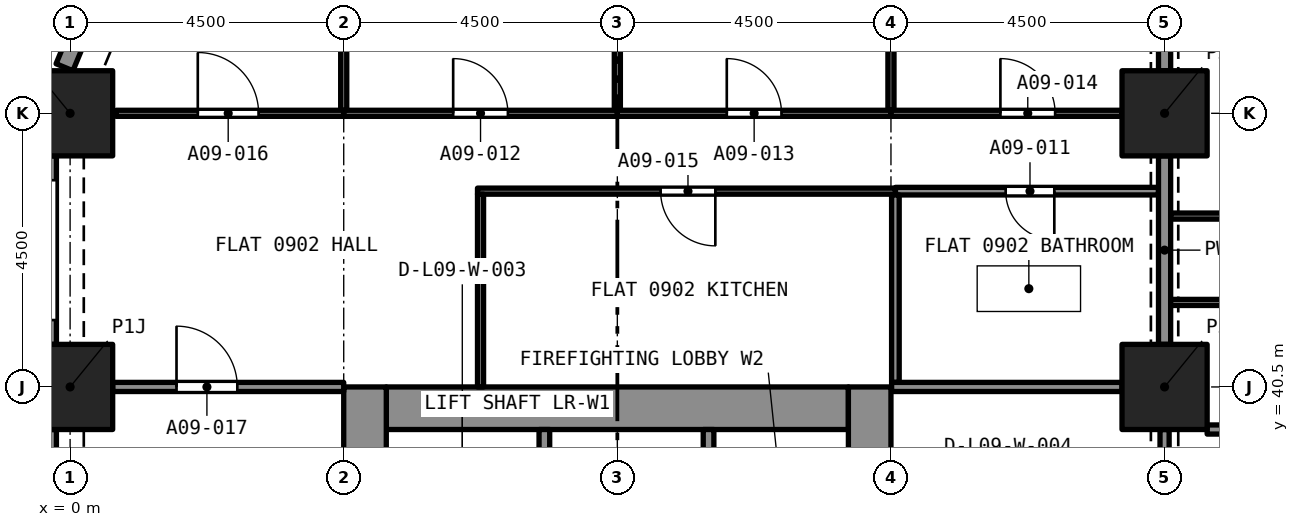
"""IFC4 building model, lengths in metres.
Left out: names, types, materials, properties, quantities, classifications, styles, units other than length and angle.
Written with IfcOpenShell. Run it as: python <this file> out.ifc"""

import sys

from ifc_helpers import new_model, si_unit, direction, frame, frame_2d, origin, origin_2d, place, context, subcontext, project, spatial, rectangle, extrude, element, fill, save


model = new_model("IFC4")
c1 = context("Model", 3, precision=1e-05, world=origin(), true_north=direction((0.0, 1.0)))
c2 = subcontext(c1, "Body", "Model", "MODEL_VIEW")
j1 = project(units=[si_unit("LENGTHUNIT", "METRE"), si_unit("PLANEANGLEUNIT", "RADIAN")], contexts=[c1])
p1 = place(None, origin())
s1 = spatial("IfcSite", under=j1, at=p1, CompositionType="ELEMENT")
p2 = place(p1, origin())
s2 = spatial("IfcBuilding", under=s1, at=p2, CompositionType="ELEMENT")
p3 = place(p2, frame((0.0, 0.0, 40.0)))
s3 = spatial("IfcBuildingStorey", under=s2, at=p3, CompositionType="ELEMENT", Elevation=40.0)
for number, where, z_axis, x_axis in (
    (1, (0.0, 40.5, 0.0), (0.0, 0.0, 1.0), (1.0, 0.0, 0.0)),
    (2, (18.0, 40.5, 0.0), (0.0, 0.0, 1.0), (1.0, 0.0, 0.0)),
    (3, (0.0, 45.0, 0.0), (0.0, 0.0, 1.0), (1.0, 0.0, 0.0)),
    (4, (18.0, 45.0, 0.0), (0.0, 0.0, 1.0), (1.0, 0.0, 0.0)),
):
    element("IfcColumn", number, at=place(p3, frame(where, z_axis=z_axis, x_axis=x_axis)), inside=s3, PredefinedType="COLUMN", context=c2, shape_type="SweptSolid", body=[
        extrude(rectangle(XDim=1.4, YDim=1.4, at=origin_2d()), origin(), (0.0, 0.0, 1.0), 3.2),
    ])
p4 = place(p3, frame((5.2, 40.15, 0.0), z_axis=(0.0, 0.0, 1.0), x_axis=(1.0, 0.0, 0.0)))
e5 = element("IfcWall", 5, at=p4, inside=s3, PredefinedType="SOLIDWALL", context=c2, shape_type="SweptSolid", body=[
    extrude(rectangle(XDim=7.6, YDim=0.7, at=frame_2d((3.8, 0.0))), origin(), (0.0, 0.0, 1.0), 3.2),
])
p5 = place(p3, frame((4.85, 27.0, 0.0), z_axis=(0.0, 0.0, 1.0), x_axis=(0.0, 1.0, 0.0)))
e6 = element("IfcWall", 6, at=p5, inside=s3, PredefinedType="SOLIDWALL", context=c2, shape_type="SweptSolid", body=[
    extrude(rectangle(XDim=13.5, YDim=0.7, at=frame_2d((6.75, 0.0))), origin(), (0.0, 0.0, 1.0), 3.2),
])
p6 = place(p5, frame((8.95, 0.0, 0.0)))
e7 = element("IfcOpeningElement", 7, at=p6, cuts=e6, PredefinedType="OPENING", context=c2, shape_type="SweptSolid", body=[
    extrude(rectangle(XDim=1.2, YDim=2.1, at=frame_2d((0.6, 1.05))), frame((0.0, 0.36, 0.0), z_axis=(0.0, -1.0, 0.0), x_axis=(1.0, 0.0, 0.0)), (0.0, 0.0, 1.0), 0.72),
])
p7 = place(p3, frame((13.15, 27.0, 0.0), z_axis=(0.0, 0.0, 1.0), x_axis=(0.0, 1.0, 0.0)))
e8 = element("IfcWall", 8, at=p7, inside=s3, PredefinedType="SOLIDWALL", context=c2, shape_type="SweptSolid", body=[
    extrude(rectangle(XDim=13.5, YDim=0.7, at=frame_2d((6.75, 0.0))), origin(), (0.0, 0.0, 1.0), 3.2),
])
p8 = place(p7, frame((11.1, 0.0, 0.0)))
e9 = element("IfcOpeningElement", 9, at=p8, cuts=e8, PredefinedType="OPENING", context=c2, shape_type="SweptSolid", body=[
    extrude(rectangle(XDim=1.1, YDim=2.1, at=frame_2d((0.55, 1.05))), frame((0.0, 0.36, 0.0), z_axis=(0.0, -1.0, 0.0), x_axis=(1.0, 0.0, 0.0)), (0.0, 0.0, 1.0), 0.72),
])
p9 = place(p7, frame((8.95, 0.0, 0.0)))
e10 = element("IfcOpeningElement", 10, at=p9, cuts=e8, PredefinedType="OPENING", context=c2, shape_type="SweptSolid", body=[
    extrude(rectangle(XDim=1.2, YDim=2.1, at=frame_2d((0.6, 1.05))), frame((0.0, 0.36, 0.0), z_axis=(0.0, -1.0, 0.0), x_axis=(1.0, 0.0, 0.0)), (0.0, 0.0, 1.0), 0.72),
])
p10 = place(p3, frame((-0.092, 45.757, 0.0), z_axis=(0.0, 0.0, 1.0), x_axis=(0.382737135771, 0.923857286003, 0.0)))
e11 = element("IfcWall", 11, at=p10, inside=s3, PredefinedType="SOLIDWALL", context=c2, shape_type="SweptSolid", body=[
    extrude(rectangle(XDim=1.865, YDim=0.3, at=frame_2d((0.933, 0.0))), origin(), (0.0, 0.0, 1.0), 3.2),
])
p11 = place(p10, frame((0.508, 0.0, 0.45)))
e12 = element("IfcOpeningElement", 12, at=p11, cuts=e11, PredefinedType="OPENING", context=c2, shape_type="SweptSolid", body=[
    extrude(rectangle(XDim=1.1, YDim=1.95, at=frame_2d((0.55, 0.975))), frame((0.0, 0.16, 0.0), z_axis=(0.0, -1.0, 0.0), x_axis=(1.0, 0.0, 0.0)), (0.0, 0.0, 1.0), 0.32),
])
p12 = place(p3, frame((-0.375, 41.2, 0.0), z_axis=(0.0, 0.0, 1.0), x_axis=(0.0, 1.0, 0.0)))
e13 = element("IfcWall", 13, at=p12, inside=s3, PredefinedType="SOLIDWALL", context=c2, shape_type="SweptSolid", body=[
    extrude(rectangle(XDim=3.1, YDim=0.3, at=frame_2d((1.55, 0.0))), origin(), (0.0, 0.0, 1.0), 3.2),
])
p13 = place(p12, frame((0.4, 0.0, 0.45)))
e14 = element("IfcOpeningElement", 14, at=p13, cuts=e13, PredefinedType="OPENING", context=c2, shape_type="SweptSolid", body=[
    extrude(rectangle(XDim=2.3, YDim=1.95, at=frame_2d((1.15, 0.975))), frame((0.0, 0.16, 0.0), z_axis=(0.0, -1.0, 0.0), x_axis=(1.0, 0.0, 0.0)), (0.0, 0.0, 1.0), 0.32),
])
p14 = place(p3, frame((-0.375, 36.7, 0.0), z_axis=(0.0, 0.0, 1.0), x_axis=(0.0, 1.0, 0.0)))
e15 = element("IfcWall", 15, at=p14, inside=s3, PredefinedType="SOLIDWALL", context=c2, shape_type="SweptSolid", body=[
    extrude(rectangle(XDim=3.1, YDim=0.3, at=frame_2d((1.55, 0.0))), origin(), (0.0, 0.0, 1.0), 3.2),
])
p15 = place(p14, frame((0.4, 0.0, 0.45)))
e16 = element("IfcOpeningElement", 16, at=p15, cuts=e15, PredefinedType="OPENING", context=c2, shape_type="SweptSolid", body=[
    extrude(rectangle(XDim=2.3, YDim=1.95, at=frame_2d((1.15, 0.975))), frame((0.0, 0.16, 0.0), z_axis=(0.0, -1.0, 0.0), x_axis=(1.0, 0.0, 0.0)), (0.0, 0.0, 1.0), 0.32),
])
p16 = place(p3, frame((17.9, 43.72, 0.0), z_axis=(0.0, 0.0, 1.0), x_axis=(-1.0, 0.0, 0.0)))
e17 = element("IfcWall", 17, at=p16, inside=s3, PredefinedType="PARTITIONING", context=c2, shape_type="SweptSolid", body=[
    extrude(rectangle(XDim=4.327, YDim=0.125, at=frame_2d((2.163, 0.0))), origin(), (0.0, 0.0, 1.0), 2.9),
])
p17 = place(p16, frame((1.713, 0.0, 0.0)))
e18 = element("IfcOpeningElement", 18, at=p17, cuts=e17, PredefinedType="OPENING", context=c2, shape_type="SweptSolid", body=[
    extrude(rectangle(XDim=0.8, YDim=2.1, at=frame_2d((0.4, 1.05))), frame((0.0, 0.073, 0.0), z_axis=(0.0, -1.0, 0.0), x_axis=(1.0, 0.0, 0.0)), (0.0, 0.0, 1.0), 0.145),
])
p18 = place(p3, frame((13.573, 40.575, 0.0), z_axis=(0.0, 0.0, 1.0), x_axis=(0.0, 1.0, 0.0)))
e19 = element("IfcWall", 19, at=p18, inside=s3, PredefinedType="PARTITIONING", context=c2, shape_type="SweptSolid", body=[
    extrude(rectangle(XDim=3.083, YDim=0.125, at=frame_2d((1.541, 0.0))), origin(), (0.0, 0.0, 1.0), 2.9),
])
p19 = place(p3, frame((18.0, 41.2, 0.0), z_axis=(0.0, 0.0, 1.0), x_axis=(0.0, 1.0, 0.0)))
e20 = element("IfcWall", 20, at=p19, inside=s3, PredefinedType="PARTITIONING", context=c2, shape_type="SweptSolid", body=[
    extrude(rectangle(XDim=3.1, YDim=0.2, at=frame_2d((1.55, 0.0))), origin(), (0.0, 0.0, 1.0), 2.38),
])
p20 = place(p3, frame((13.511, 40.5, 0.0), z_axis=(0.0, 0.0, 1.0), x_axis=(1.0, 0.0, 0.0)))
e21 = element("IfcWall", 21, at=p20, inside=s3, PredefinedType="PARTITIONING", context=c2, shape_type="SweptSolid", body=[
    extrude(rectangle(XDim=3.789, YDim=0.15, at=frame_2d((1.895, 0.0))), origin(), (0.0, 0.0, 1.0), 2.9),
])
p21 = place(p3, frame((9.0, 45.05, 0.0), z_axis=(0.0, 0.0, 1.0), x_axis=(0.0, 1.0, 0.0)))
e22 = element("IfcWall", 22, at=p21, inside=s3, PredefinedType="PARTITIONING", context=c2, shape_type="SweptSolid", body=[
    extrude(rectangle(XDim=3.75, YDim=0.1, at=frame_2d((1.875, 0.0))), origin(), (0.0, 0.0, 1.0), 2.9),
])
p22 = place(p3, frame((4.5, 45.0, 0.0), z_axis=(0.0, 0.0, 1.0), x_axis=(1.0, 0.0, 0.0)))
e23 = element("IfcWall", 23, at=p22, inside=s3, PredefinedType="PARTITIONING", context=c2, shape_type="SweptSolid", body=[
    extrude(rectangle(XDim=4.5, YDim=0.1, at=frame_2d((2.25, 0.0))), origin(), (0.0, 0.0, 1.0), 2.9),
])
p23 = place(p22, frame((1.8, 0.0, 0.0)))
e24 = element("IfcOpeningElement", 24, at=p23, cuts=e23, PredefinedType="OPENING", context=c2, shape_type="SweptSolid", body=[
    extrude(rectangle(XDim=0.9, YDim=2.1, at=frame_2d((0.45, 1.05))), frame((0.0, 0.06, 0.0), z_axis=(0.0, -1.0, 0.0), x_axis=(1.0, 0.0, 0.0)), (0.0, 0.0, 1.0), 0.12),
])
p24 = place(p3, frame((4.5, 45.05, 0.0), z_axis=(0.0, 0.0, 1.0), x_axis=(0.0, 1.0, 0.0)))
e25 = element("IfcWall", 25, at=p24, inside=s3, PredefinedType="PARTITIONING", context=c2, shape_type="SweptSolid", body=[
    extrude(rectangle(XDim=3.692, YDim=0.1, at=frame_2d((1.846, 0.0))), origin(), (0.0, 0.0, 1.0), 2.9),
])
p25 = place(p3, frame((13.5, 45.05, 0.0), z_axis=(0.0, 0.0, 1.0), x_axis=(0.0, 1.0, 0.0)))
e26 = element("IfcWall", 26, at=p25, inside=s3, PredefinedType="PARTITIONING", context=c2, shape_type="SweptSolid", body=[
    extrude(rectangle(XDim=3.75, YDim=0.1, at=frame_2d((1.875, 0.0))), origin(), (0.0, 0.0, 1.0), 2.9),
])
p26 = place(p3, frame((9.0, 45.0, 0.0), z_axis=(0.0, 0.0, 1.0), x_axis=(1.0, 0.0, 0.0)))
e27 = element("IfcWall", 27, at=p26, inside=s3, PredefinedType="PARTITIONING", context=c2, shape_type="SweptSolid", body=[
    extrude(rectangle(XDim=4.5, YDim=0.1, at=frame_2d((2.25, 0.0))), origin(), (0.0, 0.0, 1.0), 2.9),
])
p27 = place(p26, frame((1.8, 0.0, 0.0)))
e28 = element("IfcOpeningElement", 28, at=p27, cuts=e27, PredefinedType="OPENING", context=c2, shape_type="SweptSolid", body=[
    extrude(rectangle(XDim=0.9, YDim=2.1, at=frame_2d((0.45, 1.05))), frame((0.0, 0.06, 0.0), z_axis=(0.0, -1.0, 0.0), x_axis=(1.0, 0.0, 0.0)), (0.0, 0.0, 1.0), 0.12),
])
p28 = place(p3, frame((13.5, 45.0, 0.0), z_axis=(0.0, 0.0, 1.0), x_axis=(1.0, 0.0, 0.0)))
e29 = element("IfcWall", 29, at=p28, inside=s3, PredefinedType="PARTITIONING", context=c2, shape_type="SweptSolid", body=[
    extrude(rectangle(XDim=3.8, YDim=0.1, at=frame_2d((1.9, 0.0))), origin(), (0.0, 0.0, 1.0), 2.9),
])
p29 = place(p28, frame((1.8, 0.0, 0.0)))
e30 = element("IfcOpeningElement", 30, at=p29, cuts=e29, PredefinedType="OPENING", context=c2, shape_type="SweptSolid", body=[
    extrude(rectangle(XDim=0.9, YDim=2.1, at=frame_2d((0.45, 1.05))), frame((0.0, 0.06, 0.0), z_axis=(0.0, -1.0, 0.0), x_axis=(1.0, 0.0, 0.0)), (0.0, 0.0, 1.0), 0.12),
])
p30 = place(p3, frame((18.0, 45.7, 0.0), z_axis=(0.0, 0.0, 1.0), x_axis=(0.0, 1.0, 0.0)))
e31 = element("IfcWall", 31, at=p30, inside=s3, PredefinedType="PARTITIONING", context=c2, shape_type="SweptSolid", body=[
    extrude(rectangle(XDim=3.1, YDim=0.2, at=frame_2d((1.55, 0.0))), origin(), (0.0, 0.0, 1.0), 2.38),
])
p31 = place(p3, frame((13.573, 43.72, 0.0), z_axis=(0.0, 0.0, 1.0), x_axis=(-1.0, 0.0, 0.0)))
e32 = element("IfcWall", 32, at=p31, inside=s3, PredefinedType="PARTITIONING", context=c2, shape_type="SweptSolid", body=[
    extrude(rectangle(XDim=6.873, YDim=0.1, at=frame_2d((3.437, 0.0))), origin(), (0.0, 0.0, 1.0), 2.9),
])
p32 = place(p31, frame((2.962, 0.0, 0.0)))
e33 = element("IfcOpeningElement", 33, at=p32, cuts=e32, PredefinedType="OPENING", context=c2, shape_type="SweptSolid", body=[
    extrude(rectangle(XDim=0.9, YDim=2.1, at=frame_2d((0.45, 1.05))), frame((0.0, 0.06, 0.0), z_axis=(0.0, -1.0, 0.0), x_axis=(1.0, 0.0, 0.0)), (0.0, 0.0, 1.0), 0.12),
])
p33 = place(p3, frame((6.75, 40.5, 0.0), z_axis=(0.0, 0.0, 1.0), x_axis=(0.0, 1.0, 0.0)))
e34 = element("IfcWall", 34, at=p33, inside=s3, PredefinedType="PARTITIONING", context=c2, shape_type="SweptSolid", body=[
    extrude(rectangle(XDim=3.17, YDim=0.1, at=frame_2d((1.585, 0.0))), origin(), (0.0, 0.0, 1.0), 2.9),
])
p34 = place(p3, frame((0.758, 45.0, 0.0), z_axis=(0.0, 0.0, 1.0), x_axis=(1.0, 0.0, 0.0)))
e35 = element("IfcWall", 35, at=p34, inside=s3, PredefinedType="PARTITIONING", context=c2, shape_type="SweptSolid", body=[
    extrude(rectangle(XDim=3.742, YDim=0.1, at=frame_2d((1.871, 0.0))), origin(), (0.0, 0.0, 1.0), 2.9),
])
p35 = place(p34, frame((1.342, 0.0, 0.0)))
e36 = element("IfcOpeningElement", 36, at=p35, cuts=e35, PredefinedType="OPENING", context=c2, shape_type="SweptSolid", body=[
    extrude(rectangle(XDim=1.0, YDim=2.1, at=frame_2d((0.5, 1.05))), frame((0.0, 0.06, 0.0), z_axis=(0.0, -1.0, 0.0), x_axis=(1.0, 0.0, 0.0)), (0.0, 0.0, 1.0), 0.12),
])
p36 = place(p3, frame((0.7, 40.5, 0.0), z_axis=(0.0, 0.0, 1.0), x_axis=(1.0, 0.0, 0.0)))
e37 = element("IfcWall", 37, at=p36, inside=s3, PredefinedType="PARTITIONING", context=c2, shape_type="SweptSolid", body=[
    extrude(rectangle(XDim=3.8, YDim=0.15, at=frame_2d((1.9, 0.0))), origin(), (0.0, 0.0, 1.0), 2.9),
])
p37 = place(p36, frame((1.05, 0.0, 0.0)))
e38 = element("IfcOpeningElement", 38, at=p37, cuts=e37, PredefinedType="OPENING", context=c2, shape_type="SweptSolid", body=[
    extrude(rectangle(XDim=1.0, YDim=2.1, at=frame_2d((0.5, 1.05))), frame((0.0, 0.085, 0.0), z_axis=(0.0, -1.0, 0.0), x_axis=(1.0, 0.0, 0.0)), (0.0, 0.0, 1.0), 0.17),
])
p38 = place(p3, frame((27.425, 41.89, 0.0), z_axis=(0.0, 0.0, 1.0), x_axis=(-1.0, 0.0, 0.0)))
e39 = element("IfcWall", 39, at=p38, inside=s3, PredefinedType="PARTITIONING", context=c2, shape_type="SweptSolid", body=[
    extrude(rectangle(XDim=9.325, YDim=0.1, at=frame_2d((4.663, 0.0))), origin(), (0.0, 0.0, 1.0), 2.75),
])
p39 = place(p38, frame((4.288, 0.0, 0.0)))
e40 = element("IfcOpeningElement", 40, at=p39, cuts=e39, PredefinedType="OPENING", context=c2, shape_type="SweptSolid", body=[
    extrude(rectangle(XDim=0.9, YDim=2.1, at=frame_2d((0.45, 1.05))), frame((0.0, 0.06, 0.0), z_axis=(0.0, -1.0, 0.0), x_axis=(1.0, 0.0, 0.0)), (0.0, 0.0, 1.0), 0.12),
])
p40 = place(p3, frame((18.1, 43.31, 0.0), z_axis=(0.0, 0.0, 1.0), x_axis=(1.0, 0.0, 0.0)))
e41 = element("IfcWall", 41, at=p40, inside=s3, PredefinedType="PARTITIONING", context=c2, shape_type="SweptSolid", body=[
    extrude(rectangle(XDim=4.4, YDim=0.1, at=frame_2d((2.2, 0.0))), origin(), (0.0, 0.0, 1.0), 2.75),
])
p41 = place(p40, frame((1.65, 0.0, 0.0)))
e42 = element("IfcOpeningElement", 42, at=p41, cuts=e41, PredefinedType="OPENING", context=c2, shape_type="SweptSolid", body=[
    extrude(rectangle(XDim=1.0, YDim=2.1, at=frame_2d((0.5, 1.05))), frame((0.0, 0.06, 0.0), z_axis=(0.0, -1.0, 0.0), x_axis=(1.0, 0.0, 0.0)), (0.0, 0.0, 1.0), 0.12),
])
p42 = place(p3, frame((18.7, 39.8, 0.0), z_axis=(0.0, 0.0, 1.0), x_axis=(1.0, 0.0, 0.0)))
e43 = element("IfcWall", 43, at=p42, inside=s3, PredefinedType="PARTITIONING", context=c2, shape_type="SweptSolid", body=[
    extrude(rectangle(XDim=8.675, YDim=0.15, at=frame_2d((4.337, 0.0))), origin(), (0.0, 0.0, 1.0), 2.75),
])
p43 = place(p3, frame((18.0, 39.8, 0.0), z_axis=(0.0, 0.0, 1.0), x_axis=(0.0, -1.0, 0.0)))
e44 = element("IfcWall", 44, at=p43, inside=s3, PredefinedType="PARTITIONING", context=c2, shape_type="SweptSolid", body=[
    extrude(rectangle(XDim=3.1, YDim=0.15, at=frame_2d((1.55, 0.0))), origin(), (0.0, 0.0, 1.0), 2.38),
])
p44 = place(p43, frame((0.95, 0.0, 0.0)))
e45 = element("IfcOpeningElement", 45, at=p44, cuts=e44, PredefinedType="OPENING", context=c2, shape_type="SweptSolid", body=[
    extrude(rectangle(XDim=1.2, YDim=2.1, at=frame_2d((0.6, 1.05))), frame((0.0, 0.085, 0.0), z_axis=(0.0, -1.0, 0.0), x_axis=(1.0, 0.0, 0.0)), (0.0, 0.0, 1.0), 0.17),
])
p45 = place(p3, frame((7.8, 37.5, 0.0), z_axis=(0.0, 0.0, 1.0), x_axis=(0.0, 1.0, 0.0)))
e46 = element("IfcWall", 46, at=p45, inside=s3, PredefinedType="SOLIDWALL", context=c2, shape_type="SweptSolid", body=[
    extrude(rectangle(XDim=2.3, YDim=0.175, at=frame_2d((1.15, 0.0))), origin(), (0.0, 0.0, 1.0), 2.9),
])
p46 = place(p3, frame((10.5, 37.5, 0.0), z_axis=(0.0, 0.0, 1.0), x_axis=(0.0, 1.0, 0.0)))
e47 = element("IfcWall", 47, at=p46, inside=s3, PredefinedType="SOLIDWALL", context=c2, shape_type="SweptSolid", body=[
    extrude(rectangle(XDim=2.3, YDim=0.175, at=frame_2d((1.15, 0.0))), origin(), (0.0, 0.0, 1.0), 2.9),
])
p47 = place(p46, frame((0.65, 0.0, 0.0)))
e48 = element("IfcOpeningElement", 48, at=p47, cuts=e47, PredefinedType="OPENING", context=c2, shape_type="SweptSolid", body=[
    extrude(rectangle(XDim=1.0, YDim=2.1, at=frame_2d((0.5, 1.05))), frame((0.0, 0.097, 0.0), z_axis=(0.0, -1.0, 0.0), x_axis=(1.0, 0.0, 0.0)), (0.0, 0.0, 1.0), 0.195),
])
p48 = place(p17, origin())
e49 = element("IfcDoor", 49, at=p48, inside=s3, OperationType="SINGLE_SWING_LEFT", PredefinedType="DOOR", context=c2, shape_type="SweptSolid", body=[
    extrude(rectangle(XDim=0.8, YDim=2.1, at=frame_2d((0.4, 1.05))), frame((0.0, 0.025, 0.0), z_axis=(0.0, -1.0, 0.0), x_axis=(1.0, 0.0, 0.0)), (0.0, 0.0, 1.0), 0.05),
])
fill(e18, e49)
p49 = place(p23, origin())
e50 = element("IfcDoor", 50, at=p49, inside=s3, OperationType="SINGLE_SWING_RIGHT", PredefinedType="DOOR", context=c2, shape_type="SweptSolid", body=[
    extrude(rectangle(XDim=0.9, YDim=2.1, at=frame_2d((0.45, 1.05))), frame((0.0, 0.025, 0.0), z_axis=(0.0, -1.0, 0.0), x_axis=(1.0, 0.0, 0.0)), (0.0, 0.0, 1.0), 0.05),
])
fill(e24, e50)
p50 = place(p27, origin())
e51 = element("IfcDoor", 51, at=p50, inside=s3, OperationType="SINGLE_SWING_LEFT", PredefinedType="DOOR", context=c2, shape_type="SweptSolid", body=[
    extrude(rectangle(XDim=0.9, YDim=2.1, at=frame_2d((0.45, 1.05))), frame((0.0, 0.025, 0.0), z_axis=(0.0, -1.0, 0.0), x_axis=(1.0, 0.0, 0.0)), (0.0, 0.0, 1.0), 0.05),
])
fill(e28, e51)
p51 = place(p29, origin())
e52 = element("IfcDoor", 52, at=p51, inside=s3, OperationType="SINGLE_SWING_RIGHT", PredefinedType="DOOR", context=c2, shape_type="SweptSolid", body=[
    extrude(rectangle(XDim=0.9, YDim=2.1, at=frame_2d((0.45, 1.05))), frame((0.0, 0.025, 0.0), z_axis=(0.0, -1.0, 0.0), x_axis=(1.0, 0.0, 0.0)), (0.0, 0.0, 1.0), 0.05),
])
fill(e30, e52)
p52 = place(p32, origin())
e53 = element("IfcDoor", 53, at=p52, inside=s3, OperationType="SINGLE_SWING_LEFT", PredefinedType="DOOR", context=c2, shape_type="SweptSolid", body=[
    extrude(rectangle(XDim=0.9, YDim=2.1, at=frame_2d((0.45, 1.05))), frame((0.0, 0.025, 0.0), z_axis=(0.0, -1.0, 0.0), x_axis=(1.0, 0.0, 0.0)), (0.0, 0.0, 1.0), 0.05),
])
fill(e33, e53)
p53 = place(p35, origin())
e54 = element("IfcDoor", 54, at=p53, inside=s3, OperationType="SINGLE_SWING_LEFT", PredefinedType="DOOR", context=c2, shape_type="SweptSolid", body=[
    extrude(rectangle(XDim=1.0, YDim=2.1, at=frame_2d((0.5, 1.05))), frame((0.0, 0.025, 0.0), z_axis=(0.0, -1.0, 0.0), x_axis=(1.0, 0.0, 0.0)), (0.0, 0.0, 1.0), 0.05),
])
fill(e36, e54)
p54 = place(p37, origin())
e55 = element("IfcDoor", 55, at=p54, inside=s3, OperationType="SINGLE_SWING_LEFT", PredefinedType="DOOR", context=c2, shape_type="SweptSolid", body=[
    extrude(rectangle(XDim=1.0, YDim=2.1, at=frame_2d((0.5, 1.05))), frame((0.0, 0.025, 0.0), z_axis=(0.0, -1.0, 0.0), x_axis=(1.0, 0.0, 0.0)), (0.0, 0.0, 1.0), 0.05),
])
fill(e38, e55)
save(model, sys.argv[1])
